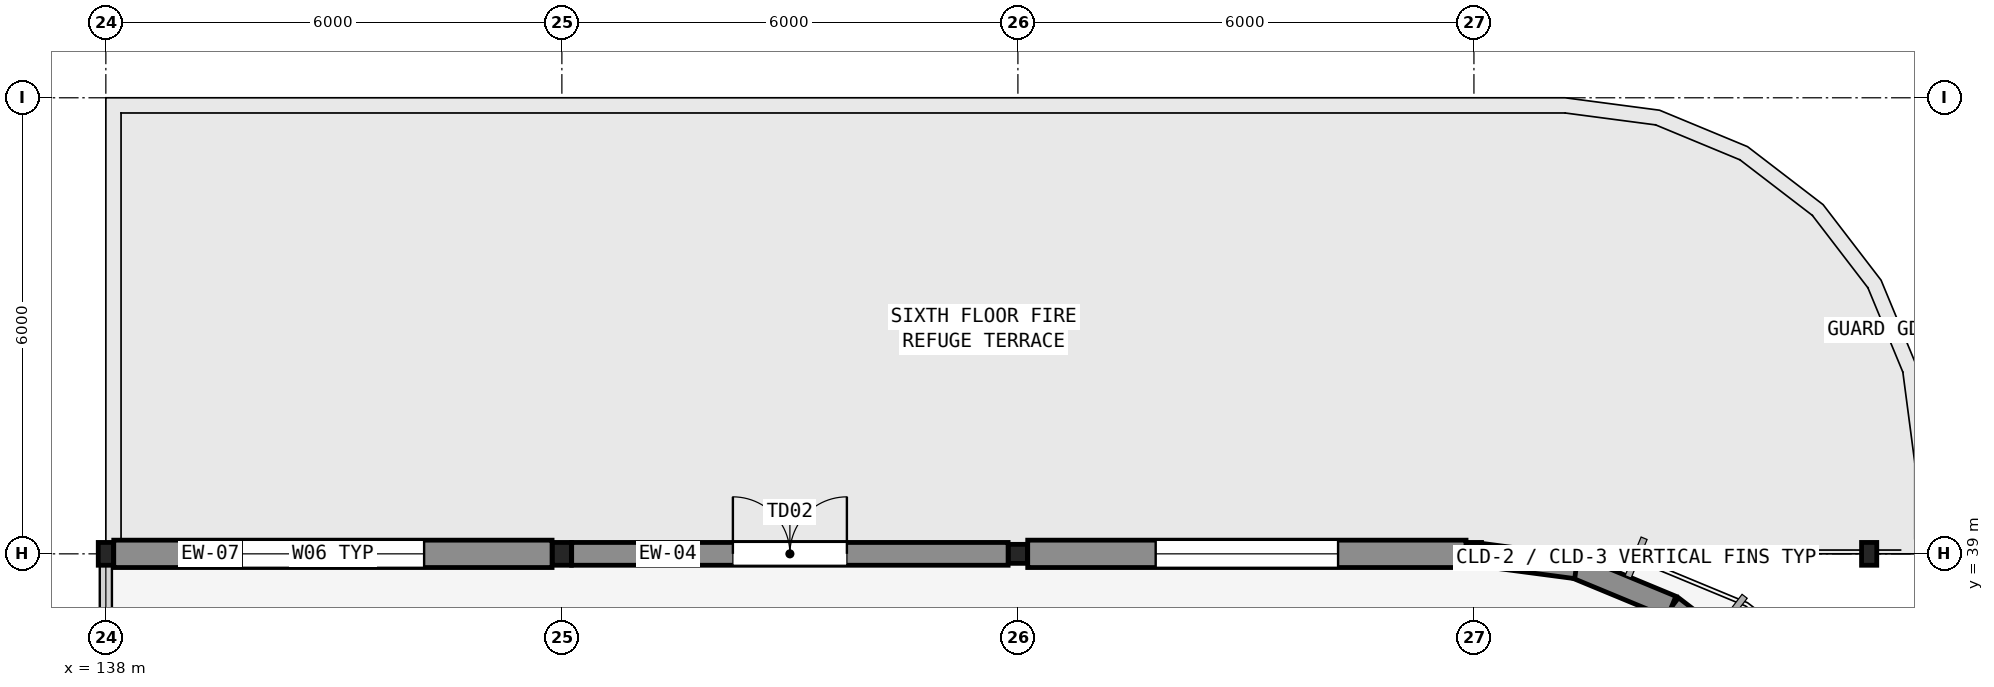
"""IFC4 building model, lengths in metres.
Left out: names, types, materials, properties, quantities, classifications, styles, units other than length and angle.
Written with IfcOpenShell. Run it as: python <this file> out.ifc"""

import sys

from ifc_helpers import new_model, si_unit, direction, frame, frame_2d, origin, origin_2d, place, context, subcontext, project, spatial, rectangle, hollow_rectangle, i_section, extrude, element, fill, save


model = new_model("IFC4")
c1 = context("Model", 3, precision=1e-05, world=origin(), true_north=direction((0.0, 1.0)))
c2 = subcontext(c1, "Body", "Model", "MODEL_VIEW")
j1 = project(units=[si_unit("LENGTHUNIT", "METRE"), si_unit("PLANEANGLEUNIT", "RADIAN")], contexts=[c1])
p1 = place(None, origin())
s1 = spatial("IfcSite", under=j1, at=p1, CompositionType="ELEMENT")
p2 = place(p1, origin())
s2 = spatial("IfcBuilding", under=s1, at=p2, CompositionType="ELEMENT")
p3 = place(p2, frame((0.0, 0.0, 26.1)))
s3 = spatial("IfcBuildingStorey", under=s2, at=p3, CompositionType="ELEMENT", Elevation=26.1)
p4 = place(p3, frame((138.0, 39.0, 0.0), z_axis=(0.0, 0.0, 1.0), x_axis=(1.0, 0.0, 0.0)))
e1 = element("IfcColumn", 1, at=p4, inside=s3, PredefinedType="COLUMN", context=c2, shape_type="SweptSolid", body=[
    extrude(hollow_rectangle(XDim=0.2, YDim=0.3, WallThickness=0.012, InnerFilletRadius=0.012, OuterFilletRadius=0.024, at=origin_2d()), origin(), (0.0, 0.0, 1.0), 3.9),
])
p5 = place(p3, frame((144.0, 39.0, 0.0), z_axis=(0.0, 0.0, 1.0), x_axis=(1.0, 0.0, 0.0)))
e2 = element("IfcColumn", 2, at=p5, inside=s3, PredefinedType="COLUMN", context=c2, shape_type="SweptSolid", body=[
    extrude(i_section(OverallWidth=0.25, OverallDepth=0.3, WebThickness=0.01, FlangeThickness=0.01, FilletRadius=0.012, at=origin_2d()), origin(), (0.0, 0.0, 1.0), 3.9),
])
p6 = place(p3, frame((150.0, 39.0, 0.0), z_axis=(0.0, 0.0, 1.0), x_axis=(1.0, 0.0, 0.0)))
e3 = element("IfcColumn", 3, at=p6, inside=s3, PredefinedType="COLUMN", context=c2, shape_type="SweptSolid", body=[
    extrude(hollow_rectangle(XDim=0.25, YDim=0.25, WallThickness=0.012, InnerFilletRadius=0.012, OuterFilletRadius=0.024, at=origin_2d()), origin(), (0.0, 0.0, 1.0), 3.9),
])
for number, where, z_axis, x_axis in (
    (4, (156.0, 39.0, 0.0), (0.0, 0.0, 1.0), (1.0, 0.0, 0.0)),
    (5, (161.2, 39.0, 0.0), (0.0, 0.0, 1.0), (1.0, 0.0, 0.0)),
):
    element("IfcColumn", number, at=place(p3, frame(where, z_axis=z_axis, x_axis=x_axis)), inside=s3, PredefinedType="COLUMN", context=c2, shape_type="SweptSolid", body=[
        extrude(hollow_rectangle(XDim=0.2, YDim=0.3, WallThickness=0.012, InnerFilletRadius=0.012, OuterFilletRadius=0.024, at=origin_2d()), origin(), (0.0, 0.0, 1.0), 3.9),
    ])
p7 = place(p3, frame((138.104, 39.0, 0.0), z_axis=(0.0, 0.0, 1.0), x_axis=(1.0, 0.0, 0.0)))
e6 = element("IfcWall", 6, at=p7, inside=s3, PredefinedType="SOLIDWALL", context=c2, shape_type="SweptSolid", body=[
    extrude(rectangle(XDim=5.767, YDim=0.36, at=frame_2d((2.884, 0.0))), origin(), (0.0, 0.0, 1.0), 3.28),
])
p8 = place(p7, frame((1.684, 0.0, 1.1)))
e7 = element("IfcOpeningElement", 7, at=p8, cuts=e6, PredefinedType="OPENING", context=c2, shape_type="SweptSolid", body=[
    extrude(rectangle(XDim=2.4, YDim=1.2, at=frame_2d((1.2, 0.6))), frame((0.0, 0.19, 0.0), z_axis=(0.0, -1.0, 0.0), x_axis=(1.0, 0.0, 0.0)), (0.0, 0.0, 1.0), 0.38),
])
p9 = place(p3, frame((144.129, 39.0, 0.0), z_axis=(0.0, 0.0, 1.0), x_axis=(1.0, 0.0, 0.0)))
e8 = element("IfcWall", 8, at=p9, inside=s3, PredefinedType="SOLIDWALL", context=c2, shape_type="SweptSolid", body=[
    extrude(rectangle(XDim=5.742, YDim=0.3, at=frame_2d((2.871, 0.0))), origin(), (0.0, 0.0, 1.0), 3.28),
])
p10 = place(p9, frame((2.121, 0.0, 0.0)))
e9 = element("IfcOpeningElement", 9, at=p10, cuts=e8, PredefinedType="OPENING", context=c2, shape_type="SweptSolid", body=[
    extrude(rectangle(XDim=1.5, YDim=2.2, at=frame_2d((0.75, 1.1))), frame((0.0, 0.16, 0.0), z_axis=(0.0, -1.0, 0.0), x_axis=(1.0, 0.0, 0.0)), (0.0, 0.0, 1.0), 0.32),
])
p11 = place(p3, frame((150.129, 39.0, 0.0), z_axis=(0.0, 0.0, 1.0), x_axis=(1.0, 0.0, 0.0)))
e10 = element("IfcWall", 10, at=p11, inside=s3, PredefinedType="SOLIDWALL", context=c2, shape_type="SweptSolid", body=[
    extrude(rectangle(XDim=5.767, YDim=0.36, at=frame_2d((2.884, 0.0))), origin(), (0.0, 0.0, 1.0), 3.28),
])
p12 = place(p11, frame((1.684, 0.0, 1.1)))
e11 = element("IfcOpeningElement", 11, at=p12, cuts=e10, PredefinedType="OPENING", context=c2, shape_type="SweptSolid", body=[
    extrude(rectangle(XDim=2.4, YDim=1.2, at=frame_2d((1.2, 0.6))), frame((0.0, 0.19, 0.0), z_axis=(0.0, -1.0, 0.0), x_axis=(1.0, 0.0, 0.0)), (0.0, 0.0, 1.0), 0.38),
])
p13 = place(p3, frame((159.677, 37.477, 0.0), z_axis=(0.0, 0.0, 1.0), x_axis=(-0.793412351971, 0.608684515772, 0.0)))
e12 = element("IfcWall", 12, at=p13, inside=s3, PredefinedType="SOLIDWALL", context=c2, shape_type="SweptSolid", body=[
    extrude(rectangle(XDim=1.357, YDim=0.3, at=frame_2d((0.679, 0.0))), origin(), (0.0, 0.0, 1.0), 3.685),
])
p14 = place(p3, frame((158.6, 38.303, 0.0), z_axis=(0.0, 0.0, 1.0), x_axis=(-0.92386777328, 0.382711820428, 0.0)))
e13 = element("IfcWall", 13, at=p14, inside=s3, PredefinedType="SOLIDWALL", context=c2, shape_type="SweptSolid", body=[
    extrude(rectangle(XDim=1.357, YDim=0.3, at=frame_2d((0.679, 0.0))), origin(), (0.0, 0.0, 1.0), 3.33),
])
p15 = place(p3, frame((157.346, 38.823, 0.0), z_axis=(0.0, 0.0, 1.0), x_axis=(-0.991450930729, 0.130480082608, 0.0)))
e14 = element("IfcWall", 14, at=p15, inside=s3, PredefinedType="SOLIDWALL", context=c2, shape_type="SweptSolid", body=[
    extrude(rectangle(XDim=1.235, YDim=0.3, at=frame_2d((0.617, 0.0))), origin(), (0.0, 0.0, 1.0), 3.28),
])
p16 = place(p8, origin())
e15 = element("IfcWindow", 15, at=p16, inside=s3, PartitioningType="SINGLE_PANEL", PredefinedType="WINDOW", context=c2, shape_type="SweptSolid", body=[
    extrude(rectangle(XDim=2.4, YDim=1.2, at=frame_2d((1.2, 0.6))), frame((0.0, 0.03, 0.0), z_axis=(0.0, -1.0, 0.0), x_axis=(1.0, 0.0, 0.0)), (0.0, 0.0, 1.0), 0.06),
])
fill(e7, e15)
p17 = place(p10, origin())
e16 = element("IfcDoor", 16, at=p17, inside=s3, OperationType="DOUBLE_DOOR_SINGLE_SWING", PredefinedType="DOOR", context=c2, shape_type="SweptSolid", body=[
    extrude(rectangle(XDim=1.5, YDim=2.2, at=frame_2d((0.75, 1.1))), frame((0.0, 0.025, 0.0), z_axis=(0.0, -1.0, 0.0), x_axis=(1.0, 0.0, 0.0)), (0.0, 0.0, 1.0), 0.05),
])
fill(e9, e16)
p18 = place(p12, origin())
e17 = element("IfcWindow", 17, at=p18, inside=s3, PartitioningType="SINGLE_PANEL", PredefinedType="WINDOW", context=c2, shape_type="SweptSolid", body=[
    extrude(rectangle(XDim=2.4, YDim=1.2, at=frame_2d((1.2, 0.6))), frame((0.0, 0.03, 0.0), z_axis=(0.0, -1.0, 0.0), x_axis=(1.0, 0.0, 0.0)), (0.0, 0.0, 1.0), 0.06),
])
fill(e11, e17)
save(model, sys.argv[1])
